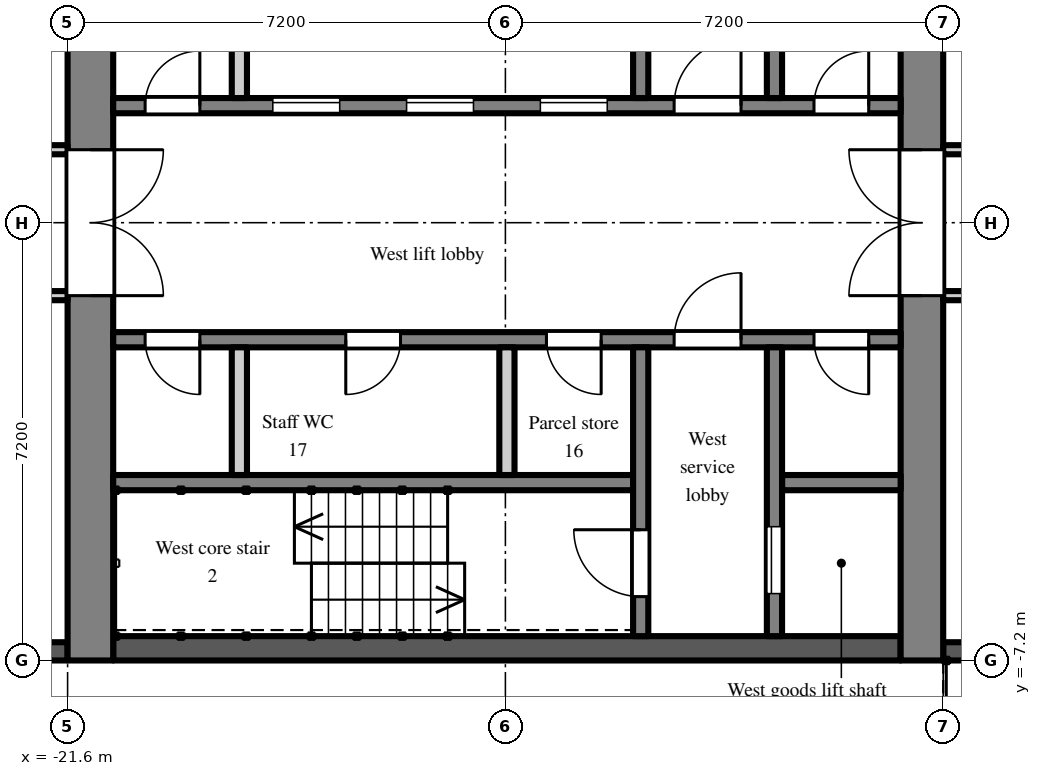
"""IFC4 building model, lengths in metres.
Left out: names, types, materials, properties, quantities, classifications, styles, units other than length and angle.
Written with IfcOpenShell. Run it as: python <this file> out.ifc"""

import sys

from ifc_helpers import new_model, si_unit, direction, frame, frame_2d, origin, place, context, subcontext, project, spatial, rectangle, extrude, element, fill, save


model = new_model("IFC4")
c1 = context("Model", 3, precision=1e-05, world=origin(), true_north=direction((0.0, 1.0)))
c2 = subcontext(c1, "Body", "Model", "MODEL_VIEW")
j1 = project(units=[si_unit("LENGTHUNIT", "METRE"), si_unit("PLANEANGLEUNIT", "RADIAN")], contexts=[c1])
p1 = place(None, origin())
s1 = spatial("IfcSite", under=j1, at=p1, CompositionType="ELEMENT")
p2 = place(p1, origin())
s2 = spatial("IfcBuilding", under=s1, at=p2, CompositionType="ELEMENT")
p3 = place(p2, frame((0.0, 0.0, 207.9)))
s3 = spatial("IfcBuildingStorey", under=s2, at=p3, CompositionType="ELEMENT", Elevation=207.9)
p4 = place(p3, frame((-24.3, -7.05, 0.0), z_axis=(0.0, 0.0, 1.0), x_axis=(1.0, 0.0, 0.0)))
e1 = element("IfcWall", 1, at=p4, inside=s3, PredefinedType="SOLIDWALL", context=c2, shape_type="SweptSolid", body=[
    extrude(rectangle(XDim=2.7, YDim=0.3, at=frame_2d((1.35, 0.0))), origin(), (0.0, 0.0, 1.0), 2.3),
])
p5 = place(p4, frame((0.75, 0.0, 0.2)))
e2 = element("IfcOpeningElement", 2, at=p5, cuts=e1, PredefinedType="OPENING", context=c2, shape_type="SweptSolid", body=[
    extrude(rectangle(XDim=1.2, YDim=1.85, at=frame_2d((0.6, 0.925))), frame((0.0, 0.16, 0.0), z_axis=(0.0, -1.0, 0.0), x_axis=(1.0, 0.0, 0.0)), (0.0, 0.0, 1.0), 0.32),
])
p6 = place(p3, frame((-7.2, -7.05, 0.0), z_axis=(0.0, 0.0, 1.0), x_axis=(1.0, 0.0, 0.0)))
e3 = element("IfcWall", 3, at=p6, inside=s3, PredefinedType="SOLIDWALL", context=c2, shape_type="SweptSolid", body=[
    extrude(rectangle(XDim=3.0, YDim=0.3, at=frame_2d((1.5, 0.0))), origin(), (0.0, 0.0, 1.0), 2.3),
])
p7 = place(p3, frame((-7.55, -7.2, 0.0), z_axis=(0.0, 0.0, 1.0), x_axis=(0.0, 1.0, 0.0)))
e4 = element("IfcWall", 4, at=p7, inside=s3, PredefinedType="SHEAR", context=c2, shape_type="SweptSolid", body=[
    extrude(rectangle(XDim=14.4, YDim=0.7, at=frame_2d((7.2, 0.0))), origin(), (0.0, 0.0, 1.0), 2.6),
])
p8 = place(p7, frame((6.0, 0.0, 0.0)))
e5 = element("IfcOpeningElement", 5, at=p8, cuts=e4, PredefinedType="OPENING", context=c2, shape_type="SweptSolid", body=[
    extrude(rectangle(XDim=2.4, YDim=2.2, at=frame_2d((1.2, 1.1))), frame((0.0, 0.36, 0.0), z_axis=(0.0, -1.0, 0.0), x_axis=(1.0, 0.0, 0.0)), (0.0, 0.0, 1.0), 0.72),
])
p9 = place(p3, frame((-21.225, -7.2, 0.0), z_axis=(0.0, 0.0, 1.0), x_axis=(0.0, 1.0, 0.0)))
e6 = element("IfcWall", 6, at=p9, inside=s3, PredefinedType="SHEAR", context=c2, shape_type="SweptSolid", body=[
    extrude(rectangle(XDim=14.4, YDim=0.75, at=frame_2d((7.2, 0.0))), origin(), (0.0, 0.0, 1.0), 2.6),
])
p10 = place(p9, frame((6.0, 0.0, 0.0)))
e7 = element("IfcOpeningElement", 7, at=p10, cuts=e6, PredefinedType="OPENING", context=c2, shape_type="SweptSolid", body=[
    extrude(rectangle(XDim=2.4, YDim=2.2, at=frame_2d((1.2, 1.1))), frame((0.0, 0.385, 0.0), z_axis=(0.0, -1.0, 0.0), x_axis=(1.0, 0.0, 0.0)), (0.0, 0.0, 1.0), 0.77),
])
p11 = place(p3, frame((-7.9, 1.925, 0.0), z_axis=(0.0, 0.0, 1.0), x_axis=(-1.0, 0.0, 0.0)))
e8 = element("IfcWall", 8, at=p11, inside=s3, PredefinedType="SHEAR", context=c2, shape_type="SweptSolid", body=[
    extrude(rectangle(XDim=12.95, YDim=0.25, at=frame_2d((6.475, 0.0))), origin(), (0.0, 0.0, 1.0), 2.6),
])
p12 = place(p11, frame((4.825, 0.0, 0.0)))
e9 = element("IfcOpeningElement", 9, at=p12, cuts=e8, PredefinedType="OPENING", context=c2, shape_type="SweptSolid", body=[
    extrude(rectangle(XDim=1.1, YDim=2.1, at=frame_2d((0.55, 1.05))), frame((0.0, 0.135, 0.0), z_axis=(0.0, -1.0, 0.0), x_axis=(1.0, 0.0, 0.0)), (0.0, 0.0, 1.0), 0.27),
])
p13 = place(p11, frame((7.025, 0.0, 0.0)))
e10 = element("IfcOpeningElement", 10, at=p13, cuts=e8, PredefinedType="OPENING", context=c2, shape_type="SweptSolid", body=[
    extrude(rectangle(XDim=1.1, YDim=2.1, at=frame_2d((0.55, 1.05))), frame((0.0, 0.135, 0.0), z_axis=(0.0, -1.0, 0.0), x_axis=(1.0, 0.0, 0.0)), (0.0, 0.0, 1.0), 0.27),
])
p14 = place(p11, frame((9.225, 0.0, 0.0)))
e11 = element("IfcOpeningElement", 11, at=p14, cuts=e8, PredefinedType="OPENING", context=c2, shape_type="SweptSolid", body=[
    extrude(rectangle(XDim=1.1, YDim=2.1, at=frame_2d((0.55, 1.05))), frame((0.0, 0.135, 0.0), z_axis=(0.0, -1.0, 0.0), x_axis=(1.0, 0.0, 0.0)), (0.0, 0.0, 1.0), 0.27),
])
p15 = place(p11, frame((0.525, 0.0, 0.0)))
e12 = element("IfcOpeningElement", 12, at=p15, cuts=e8, PredefinedType="OPENING", context=c2, shape_type="SweptSolid", body=[
    extrude(rectangle(XDim=0.9, YDim=2.1, at=frame_2d((0.45, 1.05))), frame((0.0, 0.135, 0.0), z_axis=(0.0, -1.0, 0.0), x_axis=(1.0, 0.0, 0.0)), (0.0, 0.0, 1.0), 0.27),
])
p16 = place(p11, frame((2.625, 0.0, 0.0)))
e13 = element("IfcOpeningElement", 13, at=p16, cuts=e8, PredefinedType="OPENING", context=c2, shape_type="SweptSolid", body=[
    extrude(rectangle(XDim=1.1, YDim=2.1, at=frame_2d((0.55, 1.05))), frame((0.0, 0.135, 0.0), z_axis=(0.0, -1.0, 0.0), x_axis=(1.0, 0.0, 0.0)), (0.0, 0.0, 1.0), 0.27),
])
p17 = place(p11, frame((11.525, 0.0, 0.0)))
e14 = element("IfcOpeningElement", 14, at=p17, cuts=e8, PredefinedType="OPENING", context=c2, shape_type="SweptSolid", body=[
    extrude(rectangle(XDim=0.9, YDim=2.1, at=frame_2d((0.45, 1.05))), frame((0.0, 0.135, 0.0), z_axis=(0.0, -1.0, 0.0), x_axis=(1.0, 0.0, 0.0)), (0.0, 0.0, 1.0), 0.27),
])
p18 = place(p3, frame((-9.975, 2.05, 0.0), z_axis=(0.0, 0.0, 1.0), x_axis=(0.0, 1.0, 0.0)))
e15 = element("IfcWall", 15, at=p18, inside=s3, PredefinedType="SHEAR", context=c2, shape_type="SweptSolid", body=[
    extrude(rectangle(XDim=4.75, YDim=0.25, at=frame_2d((2.375, 0.0))), origin(), (0.0, 0.0, 1.0), 2.6),
])
p19 = place(p18, frame((2.95, 0.0, 0.0)))
e16 = element("IfcOpeningElement", 16, at=p19, cuts=e15, PredefinedType="OPENING", context=c2, shape_type="SweptSolid", body=[
    extrude(rectangle(XDim=1.1, YDim=2.1, at=frame_2d((0.55, 1.05))), frame((0.0, 0.135, 0.0), z_axis=(0.0, -1.0, 0.0), x_axis=(1.0, 0.0, 0.0)), (0.0, 0.0, 1.0), 0.27),
])
p20 = place(p3, frame((-12.175, 2.05, 0.0), z_axis=(0.0, 0.0, 1.0), x_axis=(0.0, 1.0, 0.0)))
e17 = element("IfcWall", 17, at=p20, inside=s3, PredefinedType="SHEAR", context=c2, shape_type="SweptSolid", body=[
    extrude(rectangle(XDim=4.75, YDim=0.25, at=frame_2d((2.375, 0.0))), origin(), (0.0, 0.0, 1.0), 2.6),
])
p21 = place(p20, frame((3.0, 0.0, 0.0)))
e18 = element("IfcOpeningElement", 18, at=p21, cuts=e17, PredefinedType="OPENING", context=c2, shape_type="SweptSolid", body=[
    extrude(rectangle(XDim=1.1, YDim=2.1, at=frame_2d((0.55, 1.05))), frame((0.0, 0.135, 0.0), z_axis=(0.0, -1.0, 0.0), x_axis=(1.0, 0.0, 0.0)), (0.0, 0.0, 1.0), 0.27),
])
p22 = place(p3, frame((-18.775, 2.05, 0.0), z_axis=(0.0, 0.0, 1.0), x_axis=(0.0, 1.0, 0.0)))
e19 = element("IfcWall", 19, at=p22, inside=s3, PredefinedType="PARTITIONING", context=c2, shape_type="SweptSolid", body=[
    extrude(rectangle(XDim=2.1, YDim=0.25, at=frame_2d((1.05, 0.0))), origin(), (0.0, 0.0, 1.0), 2.6),
])
p23 = place(p3, frame((-7.9, -7.0, 0.0), z_axis=(0.0, 0.0, 1.0), x_axis=(-1.0, 0.0, 0.0)))
e20 = element("IfcWall", 20, at=p23, inside=s3, PredefinedType="SHEAR", context=c2, shape_type="SweptSolid", body=[
    extrude(rectangle(XDim=12.95, YDim=0.4, at=frame_2d((6.475, 0.0))), origin(), (0.0, 0.0, 1.0), 2.6),
])
p24 = place(p3, frame((-7.9, -1.925, 0.0), z_axis=(0.0, 0.0, 1.0), x_axis=(-1.0, 0.0, 0.0)))
e21 = element("IfcWall", 21, at=p24, inside=s3, PredefinedType="SHEAR", context=c2, shape_type="SweptSolid", body=[
    extrude(rectangle(XDim=12.95, YDim=0.25, at=frame_2d((6.475, 0.0))), origin(), (0.0, 0.0, 1.0), 2.6),
])
p25 = place(p24, frame((0.525, 0.0, 0.0)))
e22 = element("IfcOpeningElement", 22, at=p25, cuts=e21, PredefinedType="OPENING", context=c2, shape_type="SweptSolid", body=[
    extrude(rectangle(XDim=0.9, YDim=2.1, at=frame_2d((0.45, 1.05))), frame((0.0, 0.135, 0.0), z_axis=(0.0, -1.0, 0.0), x_axis=(1.0, 0.0, 0.0)), (0.0, 0.0, 1.0), 0.27),
])
p26 = place(p24, frame((2.625, 0.0, 0.0)))
e23 = element("IfcOpeningElement", 23, at=p26, cuts=e21, PredefinedType="OPENING", context=c2, shape_type="SweptSolid", body=[
    extrude(rectangle(XDim=1.1, YDim=2.1, at=frame_2d((0.55, 1.05))), frame((0.0, 0.135, 0.0), z_axis=(0.0, -1.0, 0.0), x_axis=(1.0, 0.0, 0.0)), (0.0, 0.0, 1.0), 0.27),
])
p27 = place(p24, frame((4.925, 0.0, 0.0)))
e24 = element("IfcOpeningElement", 24, at=p27, cuts=e21, PredefinedType="OPENING", context=c2, shape_type="SweptSolid", body=[
    extrude(rectangle(XDim=0.9, YDim=2.1, at=frame_2d((0.45, 1.05))), frame((0.0, 0.135, 0.0), z_axis=(0.0, -1.0, 0.0), x_axis=(1.0, 0.0, 0.0)), (0.0, 0.0, 1.0), 0.27),
])
p28 = place(p24, frame((8.225, 0.0, 0.0)))
e25 = element("IfcOpeningElement", 25, at=p28, cuts=e21, PredefinedType="OPENING", context=c2, shape_type="SweptSolid", body=[
    extrude(rectangle(XDim=0.9, YDim=2.1, at=frame_2d((0.45, 1.05))), frame((0.0, 0.135, 0.0), z_axis=(0.0, -1.0, 0.0), x_axis=(1.0, 0.0, 0.0)), (0.0, 0.0, 1.0), 0.27),
])
p29 = place(p24, frame((11.525, 0.0, 0.0)))
e26 = element("IfcOpeningElement", 26, at=p29, cuts=e21, PredefinedType="OPENING", context=c2, shape_type="SweptSolid", body=[
    extrude(rectangle(XDim=0.9, YDim=2.1, at=frame_2d((0.45, 1.05))), frame((0.0, 0.135, 0.0), z_axis=(0.0, -1.0, 0.0), x_axis=(1.0, 0.0, 0.0)), (0.0, 0.0, 1.0), 0.27),
])
p30 = place(p3, frame((-7.9, -4.275, 0.0), z_axis=(0.0, 0.0, 1.0), x_axis=(-1.0, 0.0, 0.0)))
e27 = element("IfcWall", 27, at=p30, inside=s3, PredefinedType="SHEAR", context=c2, shape_type="SweptSolid", body=[
    extrude(rectangle(XDim=1.95, YDim=0.25, at=frame_2d((0.975, 0.0))), origin(), (0.0, 0.0, 1.0), 2.6),
])
p31 = place(p3, frame((-12.3, -4.275, 0.0), z_axis=(0.0, 0.0, 1.0), x_axis=(-1.0, 0.0, 0.0)))
e28 = element("IfcWall", 28, at=p31, inside=s3, PredefinedType="SHEAR", context=c2, shape_type="SweptSolid", body=[
    extrude(rectangle(XDim=8.55, YDim=0.25, at=frame_2d((4.275, 0.0))), origin(), (0.0, 0.0, 1.0), 2.6),
])
p32 = place(p3, frame((-9.975, -2.05, 0.0), z_axis=(0.0, 0.0, 1.0), x_axis=(0.0, -1.0, 0.0)))
e29 = element("IfcWall", 29, at=p32, inside=s3, PredefinedType="SHEAR", context=c2, shape_type="SweptSolid", body=[
    extrude(rectangle(XDim=4.75, YDim=0.25, at=frame_2d((2.375, 0.0))), origin(), (0.0, 0.0, 1.0), 2.6),
])
p33 = place(p32, frame((2.95, 0.0, 0.0)))
e30 = element("IfcOpeningElement", 30, at=p33, cuts=e29, PredefinedType="OPENING", context=c2, shape_type="SweptSolid", body=[
    extrude(rectangle(XDim=1.1, YDim=2.1, at=frame_2d((0.55, 1.05))), frame((0.0, 0.135, 0.0), z_axis=(0.0, -1.0, 0.0), x_axis=(1.0, 0.0, 0.0)), (0.0, 0.0, 1.0), 0.27),
])
p34 = place(p3, frame((-12.175, -2.05, 0.0), z_axis=(0.0, 0.0, 1.0), x_axis=(0.0, -1.0, 0.0)))
e31 = element("IfcWall", 31, at=p34, inside=s3, PredefinedType="SHEAR", context=c2, shape_type="SweptSolid", body=[
    extrude(rectangle(XDim=4.75, YDim=0.25, at=frame_2d((2.375, 0.0))), origin(), (0.0, 0.0, 1.0), 2.6),
])
p35 = place(p34, frame((3.0, 0.0, 0.0)))
e32 = element("IfcOpeningElement", 32, at=p35, cuts=e31, PredefinedType="OPENING", context=c2, shape_type="SweptSolid", body=[
    extrude(rectangle(XDim=1.1, YDim=2.1, at=frame_2d((0.55, 1.05))), frame((0.0, 0.135, 0.0), z_axis=(0.0, -1.0, 0.0), x_axis=(1.0, 0.0, 0.0)), (0.0, 0.0, 1.0), 0.27),
])
for number, where, z_axis, x_axis in (
    (33, (-14.375, -2.05, 0.0), (0.0, 0.0, 1.0), (0.0, -1.0, 0.0)),
    (34, (-18.775, -2.05, 0.0), (0.0, 0.0, 1.0), (0.0, -1.0, 0.0)),
):
    element("IfcWall", number, at=place(p3, frame(where, z_axis=z_axis, x_axis=x_axis)), inside=s3, PredefinedType="PARTITIONING", context=c2, shape_type="SweptSolid", body=[
        extrude(rectangle(XDim=2.1, YDim=0.25, at=frame_2d((1.05, 0.0))), origin(), (0.0, 0.0, 1.0), 2.6),
    ])
p36 = place(p3, frame((-26.725, -1.2, 0.0), z_axis=(0.0, 0.0, 1.0), x_axis=(1.0, 0.0, 0.0)))
e35 = element("IfcWall", 35, at=p36, inside=s3, PredefinedType="PARTITIONING", context=c2, shape_type="SweptSolid", body=[
    extrude(rectangle(XDim=5.125, YDim=0.15, at=frame_2d((2.562, 0.0))), origin(), (0.0, 0.0, 1.0), 2.6),
])
p37 = place(p36, frame((2.875, 0.0, 0.0)))
e36 = element("IfcOpeningElement", 36, at=p37, cuts=e35, PredefinedType="OPENING", context=c2, shape_type="SweptSolid", body=[
    extrude(rectangle(XDim=0.9, YDim=2.1, at=frame_2d((0.45, 1.05))), frame((0.0, 0.085, 0.0), z_axis=(0.0, -1.0, 0.0), x_axis=(1.0, 0.0, 0.0)), (0.0, 0.0, 1.0), 0.17),
])
p38 = place(p36, frame((0.275, 0.0, 0.0)))
e37 = element("IfcOpeningElement", 37, at=p38, cuts=e35, PredefinedType="OPENING", context=c2, shape_type="SweptSolid", body=[
    extrude(rectangle(XDim=0.9, YDim=2.1, at=frame_2d((0.45, 1.05))), frame((0.0, 0.085, 0.0), z_axis=(0.0, -1.0, 0.0), x_axis=(1.0, 0.0, 0.0)), (0.0, 0.0, 1.0), 0.17),
])
p39 = place(p3, frame((-26.725, 1.2, 0.0), z_axis=(0.0, 0.0, 1.0), x_axis=(1.0, 0.0, 0.0)))
e38 = element("IfcWall", 38, at=p39, inside=s3, PredefinedType="PARTITIONING", context=c2, shape_type="SweptSolid", body=[
    extrude(rectangle(XDim=5.125, YDim=0.15, at=frame_2d((2.562, 0.0))), origin(), (0.0, 0.0, 1.0), 2.6),
])
p40 = place(p39, frame((2.875, 0.0, 0.0)))
e39 = element("IfcOpeningElement", 39, at=p40, cuts=e38, PredefinedType="OPENING", context=c2, shape_type="SweptSolid", body=[
    extrude(rectangle(XDim=0.9, YDim=2.1, at=frame_2d((0.45, 1.05))), frame((0.0, 0.085, 0.0), z_axis=(0.0, -1.0, 0.0), x_axis=(1.0, 0.0, 0.0)), (0.0, 0.0, 1.0), 0.17),
])
p41 = place(p39, frame((0.275, 0.0, 0.0)))
e40 = element("IfcOpeningElement", 40, at=p41, cuts=e38, PredefinedType="OPENING", context=c2, shape_type="SweptSolid", body=[
    extrude(rectangle(XDim=0.9, YDim=2.1, at=frame_2d((0.45, 1.05))), frame((0.0, 0.085, 0.0), z_axis=(0.0, -1.0, 0.0), x_axis=(1.0, 0.0, 0.0)), (0.0, 0.0, 1.0), 0.17),
])
p42 = place(p3, frame((-7.2, -1.2, 0.0), z_axis=(0.0, 0.0, 1.0), x_axis=(1.0, 0.0, 0.0)))
e41 = element("IfcWall", 41, at=p42, inside=s3, PredefinedType="PARTITIONING", context=c2, shape_type="SweptSolid", body=[
    extrude(rectangle(XDim=6.075, YDim=0.15, at=frame_2d((3.038, 0.0))), origin(), (0.0, 0.0, 1.0), 2.6),
])
p43 = place(p42, frame((2.55, 0.0, 0.0)))
e42 = element("IfcOpeningElement", 42, at=p43, cuts=e41, PredefinedType="OPENING", context=c2, shape_type="SweptSolid", body=[
    extrude(rectangle(XDim=0.9, YDim=2.1, at=frame_2d((0.45, 1.05))), frame((0.0, 0.085, 0.0), z_axis=(0.0, -1.0, 0.0), x_axis=(1.0, 0.0, 0.0)), (0.0, 0.0, 1.0), 0.17),
])
p44 = place(p3, frame((-7.2, 1.2, 0.0), z_axis=(0.0, 0.0, 1.0), x_axis=(1.0, 0.0, 0.0)))
e43 = element("IfcWall", 43, at=p44, inside=s3, PredefinedType="PARTITIONING", context=c2, shape_type="SweptSolid", body=[
    extrude(rectangle(XDim=6.075, YDim=0.15, at=frame_2d((3.038, 0.0))), origin(), (0.0, 0.0, 1.0), 2.6),
])
p45 = place(p44, frame((2.55, 0.0, 0.0)))
e44 = element("IfcOpeningElement", 44, at=p45, cuts=e43, PredefinedType="OPENING", context=c2, shape_type="SweptSolid", body=[
    extrude(rectangle(XDim=0.9, YDim=2.1, at=frame_2d((0.45, 1.05))), frame((0.0, 0.085, 0.0), z_axis=(0.0, -1.0, 0.0), x_axis=(1.0, 0.0, 0.0)), (0.0, 0.0, 1.0), 0.17),
])
p46 = place(p44, frame((0.55, 0.0, 0.0)))
e45 = element("IfcOpeningElement", 45, at=p46, cuts=e43, PredefinedType="OPENING", context=c2, shape_type="SweptSolid", body=[
    extrude(rectangle(XDim=0.9, YDim=2.1, at=frame_2d((0.45, 1.05))), frame((0.0, 0.085, 0.0), z_axis=(0.0, -1.0, 0.0), x_axis=(1.0, 0.0, 0.0)), (0.0, 0.0, 1.0), 0.17),
])
p47 = place(p12, origin())
e46 = element("IfcDoor", 46, at=p47, inside=s3, OperationType="SLIDING_TO_LEFT", PredefinedType="DOOR", context=c2, shape_type="SweptSolid", body=[
    extrude(rectangle(XDim=1.1, YDim=2.1, at=frame_2d((0.55, 1.05))), frame((0.0, 0.025, 0.0), z_axis=(0.0, -1.0, 0.0), x_axis=(1.0, 0.0, 0.0)), (0.0, 0.0, 1.0), 0.05),
])
fill(e9, e46)
p48 = place(p13, origin())
e47 = element("IfcDoor", 47, at=p48, inside=s3, OperationType="SLIDING_TO_LEFT", PredefinedType="DOOR", context=c2, shape_type="SweptSolid", body=[
    extrude(rectangle(XDim=1.1, YDim=2.1, at=frame_2d((0.55, 1.05))), frame((0.0, 0.025, 0.0), z_axis=(0.0, -1.0, 0.0), x_axis=(1.0, 0.0, 0.0)), (0.0, 0.0, 1.0), 0.05),
])
fill(e10, e47)
p49 = place(p14, origin())
e48 = element("IfcDoor", 48, at=p49, inside=s3, OperationType="SLIDING_TO_LEFT", PredefinedType="DOOR", context=c2, shape_type="SweptSolid", body=[
    extrude(rectangle(XDim=1.1, YDim=2.1, at=frame_2d((0.55, 1.05))), frame((0.0, 0.025, 0.0), z_axis=(0.0, -1.0, 0.0), x_axis=(1.0, 0.0, 0.0)), (0.0, 0.0, 1.0), 0.05),
])
fill(e11, e48)
p50 = place(p33, origin())
e49 = element("IfcDoor", 49, at=p50, inside=s3, OperationType="SLIDING_TO_LEFT", PredefinedType="DOOR", context=c2, shape_type="SweptSolid", body=[
    extrude(rectangle(XDim=1.1, YDim=2.1, at=frame_2d((0.55, 1.05))), frame((0.0, 0.025, 0.0), z_axis=(0.0, -1.0, 0.0), x_axis=(1.0, 0.0, 0.0)), (0.0, 0.0, 1.0), 0.05),
])
fill(e30, e49)
p51 = place(p35, frame((1.1, 0.0, 0.0), z_axis=(0.0, 0.0, 1.0), x_axis=(-1.0, 0.0, 0.0)))
e50 = element("IfcDoor", 50, at=p51, inside=s3, OperationType="SINGLE_SWING_RIGHT", PredefinedType="DOOR", context=c2, shape_type="SweptSolid", body=[
    extrude(rectangle(XDim=1.1, YDim=2.1, at=frame_2d((0.55, 1.05))), frame((0.0, 0.025, 0.0), z_axis=(0.0, -1.0, 0.0), x_axis=(1.0, 0.0, 0.0)), (0.0, 0.0, 1.0), 0.05),
])
fill(e32, e50)
p52 = place(p15, frame((0.9, 0.0, 0.0), z_axis=(0.0, 0.0, 1.0), x_axis=(-1.0, 0.0, 0.0)))
e51 = element("IfcDoor", 51, at=p52, inside=s3, OperationType="SINGLE_SWING_RIGHT", PredefinedType="DOOR", context=c2, shape_type="SweptSolid", body=[
    extrude(rectangle(XDim=0.9, YDim=2.1, at=frame_2d((0.45, 1.05))), frame((0.0, 0.025, 0.0), z_axis=(0.0, -1.0, 0.0), x_axis=(1.0, 0.0, 0.0)), (0.0, 0.0, 1.0), 0.05),
])
fill(e12, e51)
p53 = place(p25, origin())
e52 = element("IfcDoor", 52, at=p53, inside=s3, OperationType="SINGLE_SWING_LEFT", PredefinedType="DOOR", context=c2, shape_type="SweptSolid", body=[
    extrude(rectangle(XDim=0.9, YDim=2.1, at=frame_2d((0.45, 1.05))), frame((0.0, 0.025, 0.0), z_axis=(0.0, -1.0, 0.0), x_axis=(1.0, 0.0, 0.0)), (0.0, 0.0, 1.0), 0.05),
])
fill(e22, e52)
p54 = place(p16, frame((1.1, 0.0, 0.0), z_axis=(0.0, 0.0, 1.0), x_axis=(-1.0, 0.0, 0.0)))
e53 = element("IfcDoor", 53, at=p54, inside=s3, OperationType="SINGLE_SWING_RIGHT", PredefinedType="DOOR", context=c2, shape_type="SweptSolid", body=[
    extrude(rectangle(XDim=1.1, YDim=2.1, at=frame_2d((0.55, 1.05))), frame((0.0, 0.025, 0.0), z_axis=(0.0, -1.0, 0.0), x_axis=(1.0, 0.0, 0.0)), (0.0, 0.0, 1.0), 0.05),
])
fill(e13, e53)
p55 = place(p26, frame((1.1, 0.0, 0.0), z_axis=(0.0, 0.0, 1.0), x_axis=(-1.0, 0.0, 0.0)))
e54 = element("IfcDoor", 54, at=p55, inside=s3, OperationType="SINGLE_SWING_RIGHT", PredefinedType="DOOR", context=c2, shape_type="SweptSolid", body=[
    extrude(rectangle(XDim=1.1, YDim=2.1, at=frame_2d((0.55, 1.05))), frame((0.0, 0.025, 0.0), z_axis=(0.0, -1.0, 0.0), x_axis=(1.0, 0.0, 0.0)), (0.0, 0.0, 1.0), 0.05),
])
fill(e23, e54)
p56 = place(p8, origin())
e55 = element("IfcDoor", 55, at=p56, inside=s3, OperationType="DOUBLE_DOOR_DOUBLE_SWING", PredefinedType="DOOR", context=c2, shape_type="SweptSolid", body=[
    extrude(rectangle(XDim=2.4, YDim=2.2, at=frame_2d((1.2, 1.1))), frame((0.0, 0.025, 0.0), z_axis=(0.0, -1.0, 0.0), x_axis=(1.0, 0.0, 0.0)), (0.0, 0.0, 1.0), 0.05),
])
fill(e5, e55)
p57 = place(p10, frame((2.4, 0.0, 0.0), z_axis=(0.0, 0.0, 1.0), x_axis=(-1.0, 0.0, 0.0)))
e56 = element("IfcDoor", 56, at=p57, inside=s3, OperationType="DOUBLE_DOOR_DOUBLE_SWING", PredefinedType="DOOR", context=c2, shape_type="SweptSolid", body=[
    extrude(rectangle(XDim=2.4, YDim=2.2, at=frame_2d((1.2, 1.1))), frame((0.0, 0.025, 0.0), z_axis=(0.0, -1.0, 0.0), x_axis=(1.0, 0.0, 0.0)), (0.0, 0.0, 1.0), 0.05),
])
fill(e7, e56)
p58 = place(p17, frame((0.9, 0.0, 0.0), z_axis=(0.0, 0.0, 1.0), x_axis=(-1.0, 0.0, 0.0)))
e57 = element("IfcDoor", 57, at=p58, inside=s3, OperationType="SINGLE_SWING_RIGHT", PredefinedType="DOOR", context=c2, shape_type="SweptSolid", body=[
    extrude(rectangle(XDim=0.9, YDim=2.1, at=frame_2d((0.45, 1.05))), frame((0.0, 0.025, 0.0), z_axis=(0.0, -1.0, 0.0), x_axis=(1.0, 0.0, 0.0)), (0.0, 0.0, 1.0), 0.05),
])
fill(e14, e57)
p59 = place(p27, origin())
e58 = element("IfcDoor", 58, at=p59, inside=s3, OperationType="SINGLE_SWING_LEFT", PredefinedType="DOOR", context=c2, shape_type="SweptSolid", body=[
    extrude(rectangle(XDim=0.9, YDim=2.1, at=frame_2d((0.45, 1.05))), frame((0.0, 0.025, 0.0), z_axis=(0.0, -1.0, 0.0), x_axis=(1.0, 0.0, 0.0)), (0.0, 0.0, 1.0), 0.05),
])
fill(e24, e58)
p60 = place(p28, origin())
e59 = element("IfcDoor", 59, at=p60, inside=s3, OperationType="SINGLE_SWING_RIGHT", PredefinedType="DOOR", context=c2, shape_type="SweptSolid", body=[
    extrude(rectangle(XDim=0.9, YDim=2.1, at=frame_2d((0.45, 1.05))), frame((0.0, 0.025, 0.0), z_axis=(0.0, -1.0, 0.0), x_axis=(1.0, 0.0, 0.0)), (0.0, 0.0, 1.0), 0.05),
])
fill(e25, e59)
p61 = place(p29, origin())
e60 = element("IfcDoor", 60, at=p61, inside=s3, OperationType="SINGLE_SWING_LEFT", PredefinedType="DOOR", context=c2, shape_type="SweptSolid", body=[
    extrude(rectangle(XDim=0.9, YDim=2.1, at=frame_2d((0.45, 1.05))), frame((0.0, 0.025, 0.0), z_axis=(0.0, -1.0, 0.0), x_axis=(1.0, 0.0, 0.0)), (0.0, 0.0, 1.0), 0.05),
])
fill(e26, e60)
save(model, sys.argv[1])
